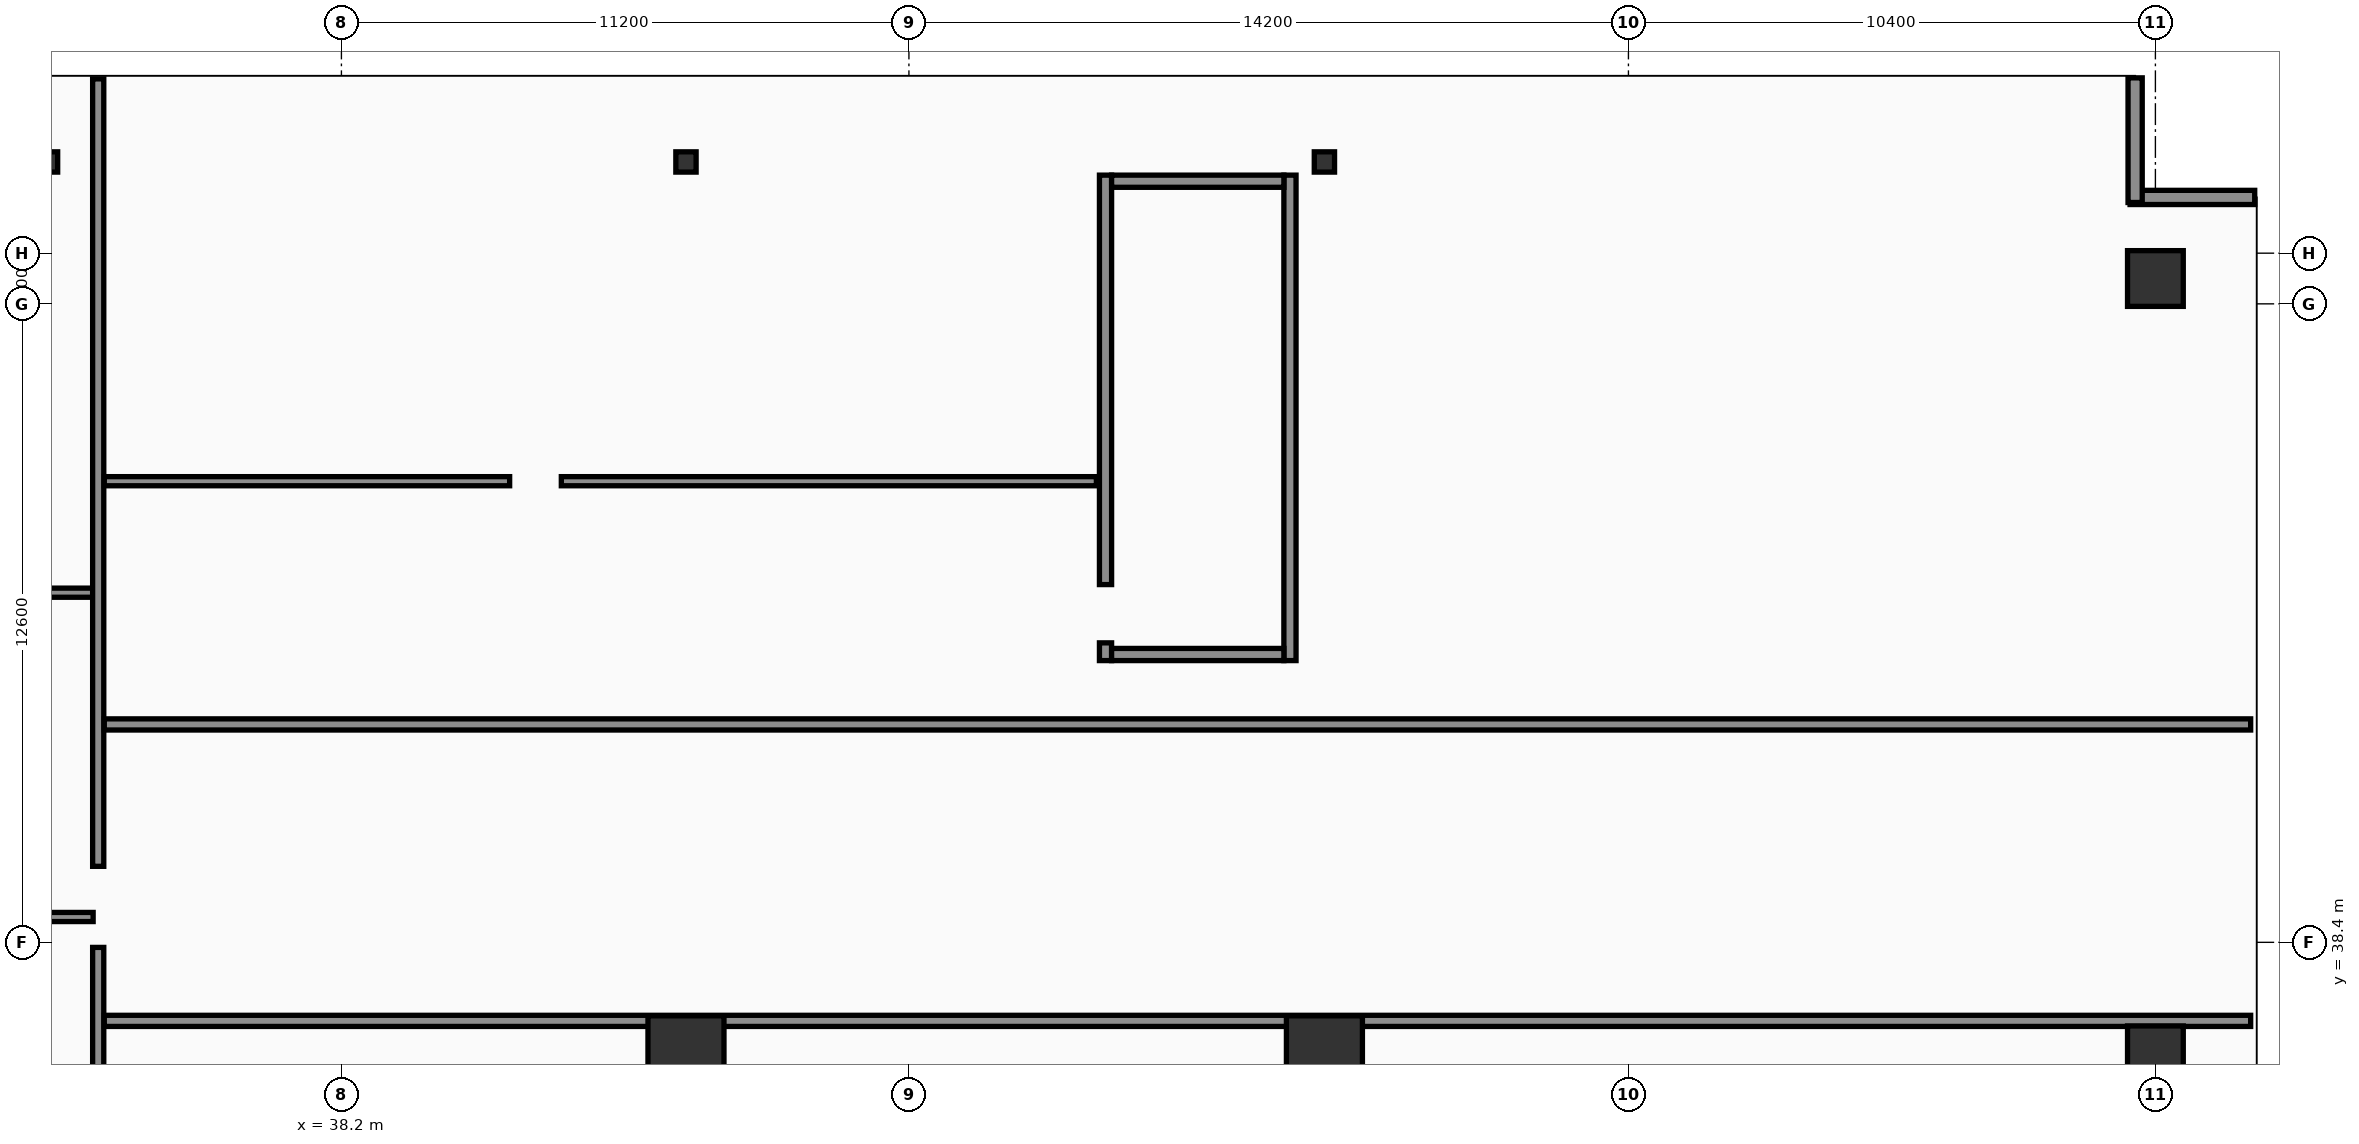
"""IFC4 building model, lengths in metres.
Left out: names, types, materials, properties, quantities, classifications, styles, units other than length and angle.
Written with IfcOpenShell. Run it as: python <this file> out.ifc"""

import sys

from ifc_helpers import new_model, si_unit, direction, frame, frame_2d, origin, origin_2d, place, context, subcontext, project, spatial, rectangle, hollow_rectangle, i_section, extrude, element, fill, save


model = new_model("IFC4")
c1 = context("Model", 3, precision=1e-05, world=origin(), true_north=direction((0.0, 1.0)))
c2 = subcontext(c1, "Body", "Model", "MODEL_VIEW")
j1 = project(units=[si_unit("LENGTHUNIT", "METRE"), si_unit("PLANEANGLEUNIT", "RADIAN")], contexts=[c1])
p1 = place(None, origin())
s1 = spatial("IfcSite", under=j1, at=p1, CompositionType="ELEMENT")
p2 = place(p1, origin())
s2 = spatial("IfcBuilding", under=s1, at=p2, CompositionType="ELEMENT")
p3 = place(p2, frame((0.0, 0.0, 22.0)))
s3 = spatial("IfcBuildingStorey", under=s2, at=p3, CompositionType="ELEMENT", Elevation=22.0)
p4 = place(p3, frame((53.28, 43.96, 0.0), z_axis=(0.0, 0.0, 1.0), x_axis=(0.0, 1.0, 0.0)))
e1 = element("IfcWall", 1, at=p4, inside=s3, PredefinedType="SOLIDWALL", context=c2, shape_type="SweptSolid", body=[
    extrude(rectangle(XDim=9.58, YDim=0.24, at=frame_2d((4.79, 0.0))), origin(), (0.0, 0.0, 1.0), 4.76),
])
p5 = place(p4, frame((0.35, 0.0, 0.0)))
e2 = element("IfcOpeningElement", 2, at=p5, cuts=e1, PredefinedType="OPENING", context=c2, shape_type="SweptSolid", body=[
    extrude(rectangle(XDim=1.15, YDim=2.2, at=frame_2d((0.575, 1.1))), frame((0.0, 0.13, 0.0), z_axis=(0.0, -1.0, 0.0), x_axis=(1.0, 0.0, 0.0)), (0.0, 0.0, 1.0), 0.26),
])
p6 = place(p3, frame((56.92, 43.96, 0.0), z_axis=(0.0, 0.0, 1.0), x_axis=(0.0, 1.0, 0.0)))
e3 = element("IfcWall", 3, at=p6, inside=s3, PredefinedType="SOLIDWALL", context=c2, shape_type="SweptSolid", body=[
    extrude(rectangle(XDim=9.58, YDim=0.24, at=frame_2d((4.79, 0.0))), origin(), (0.0, 0.0, 1.0), 4.76),
])
for number, where, z_axis, x_axis in (
    (4, (53.4, 44.08, 0.0), (0.0, 0.0, 1.0), (1.0, 0.0, 0.0)),
    (5, (53.4, 53.42, 0.0), (0.0, 0.0, 1.0), (1.0, 0.0, 0.0)),
):
    element("IfcWall", number, at=place(p3, frame(where, z_axis=z_axis, x_axis=x_axis)), inside=s3, PredefinedType="SOLIDWALL", context=c2, shape_type="SweptSolid", body=[
        extrude(rectangle(XDim=3.4, YDim=0.24, at=frame_2d((1.7, 0.0))), origin(), (0.0, 0.0, 1.0), 4.76),
    ])
for number, where, z_axis, x_axis in (
    (6, (74.0, 36.2, 0.0), (0.0, 0.0, 1.0), (1.0, 0.0, 0.0)),
    (7, (74.0, 51.5, 0.0), (0.0, 0.0, 1.0), (1.0, 0.0, 0.0)),
):
    element("IfcColumn", number, at=place(p3, frame(where, z_axis=z_axis, x_axis=x_axis)), inside=s3, PredefinedType="COLUMN", context=c2, shape_type="SweptSolid", body=[
        extrude(hollow_rectangle(XDim=1.1, YDim=1.1, WallThickness=0.045, at=origin_2d()), origin(), (0.0, 0.0, 1.0), 4.76),
    ])
for number, where, z_axis, x_axis in (
    (8, (45.0, 36.2, 0.0), (0.0, 0.0, 1.0), (1.0, 0.0, 0.0)),
    (9, (57.6, 36.2, 0.0), (0.0, 0.0, 1.0), (1.0, 0.0, 0.0)),
):
    element("IfcColumn", number, at=place(p3, frame(where, z_axis=z_axis, x_axis=x_axis)), inside=s3, PredefinedType="COLUMN", context=c2, shape_type="SweptSolid", body=[
        extrude(rectangle(XDim=1.5, YDim=1.5, at=origin_2d()), origin(), (0.0, 0.0, 1.0), 4.76),
    ])
for number, where, z_axis, x_axis in (
    (10, (32.4, 53.8, 0.0), (0.0, 0.0, 1.0), (1.0, 0.0, 0.0)),
    (11, (45.0, 53.8, 0.0), (0.0, 0.0, 1.0), (1.0, 0.0, 0.0)),
    (12, (57.6, 53.8, 0.0), (0.0, 0.0, 1.0), (1.0, 0.0, 0.0)),
):
    element("IfcColumn", number, at=place(p3, frame(where, z_axis=z_axis, x_axis=x_axis)), inside=s3, PredefinedType="PILASTER", context=c2, shape_type="SweptSolid", body=[
        extrude(i_section(OverallWidth=0.4, OverallDepth=0.4, WebThickness=0.013, FlangeThickness=0.021, FilletRadius=0.022, at=origin_2d()), origin(), (0.0, 0.0, 1.0), 4.76),
    ])
for number, where, z_axis, x_axis in (
    (13, (75.96, 53.1, 0.0), (0.0, 0.0, 1.0), (-1.0, 0.0, 0.0)),
    (14, (73.6, 53.0, 0.0), (0.0, 0.0, 1.0), (0.0, 1.0, 0.0)),
):
    element("IfcWall", number, at=place(p3, frame(where, z_axis=z_axis, x_axis=x_axis)), inside=s3, PredefinedType="SOLIDWALL", context=c2, shape_type="SweptSolid", body=[
        extrude(rectangle(XDim=2.46, YDim=0.28, at=frame_2d((1.23, 0.0))), origin(), (0.0, 0.0, 1.0), 4.76),
    ])
p7 = place(p3, frame((15.2, 38.9, 0.0), z_axis=(0.0, 0.0, 1.0), x_axis=(1.0, 0.0, 0.0)))
e15 = element("IfcWall", 15, at=p7, inside=s3, PredefinedType="PARTITIONING", context=c2, shape_type="SweptSolid", body=[
    extrude(rectangle(XDim=18.1, YDim=0.18, at=frame_2d((9.05, 0.0))), origin(), (0.0, 0.0, 1.0), 3.94),
])
p8 = place(p7, frame((2.2, 0.0, 0.0)))
e16 = element("IfcOpeningElement", 16, at=p8, cuts=e15, PredefinedType="OPENING", context=c2, shape_type="SweptSolid", body=[
    extrude(rectangle(XDim=1.02, YDim=2.2, at=frame_2d((0.51, 1.1))), frame((0.0, 0.1, 0.0), z_axis=(0.0, -1.0, 0.0), x_axis=(1.0, 0.0, 0.0)), (0.0, 0.0, 1.0), 0.2),
])
p9 = place(p7, frame((8.2, 0.0, 0.0)))
e17 = element("IfcOpeningElement", 17, at=p9, cuts=e15, PredefinedType="OPENING", context=c2, shape_type="SweptSolid", body=[
    extrude(rectangle(XDim=1.02, YDim=2.2, at=frame_2d((0.51, 1.1))), frame((0.0, 0.1, 0.0), z_axis=(0.0, -1.0, 0.0), x_axis=(1.0, 0.0, 0.0)), (0.0, 0.0, 1.0), 0.2),
])
p10 = place(p7, frame((14.2, 0.0, 0.0)))
e18 = element("IfcOpeningElement", 18, at=p10, cuts=e15, PredefinedType="OPENING", context=c2, shape_type="SweptSolid", body=[
    extrude(rectangle(XDim=1.02, YDim=2.2, at=frame_2d((0.51, 1.1))), frame((0.0, 0.1, 0.0), z_axis=(0.0, -1.0, 0.0), x_axis=(1.0, 0.0, 0.0)), (0.0, 0.0, 1.0), 0.2),
])
p11 = place(p3, frame((15.2, 45.3, 0.0), z_axis=(0.0, 0.0, 1.0), x_axis=(1.0, 0.0, 0.0)))
e19 = element("IfcWall", 19, at=p11, inside=s3, PredefinedType="PARTITIONING", context=c2, shape_type="SweptSolid", body=[
    extrude(rectangle(XDim=18.1, YDim=0.18, at=frame_2d((9.05, 0.0))), origin(), (0.0, 0.0, 1.0), 3.94),
])
p12 = place(p3, frame((33.4, 34.1, 0.0), z_axis=(0.0, 0.0, 1.0), x_axis=(0.0, 1.0, 0.0)))
e20 = element("IfcWall", 20, at=p12, inside=s3, PredefinedType="SOLIDWALL", context=c2, shape_type="SweptSolid", body=[
    extrude(rectangle(XDim=21.34, YDim=0.22, at=frame_2d((10.67, 0.0))), origin(), (0.0, 0.0, 1.0), 3.94),
])
p13 = place(p12, frame((4.2, 0.0, 0.0)))
e21 = element("IfcOpeningElement", 21, at=p13, cuts=e20, PredefinedType="OPENING", context=c2, shape_type="SweptSolid", body=[
    extrude(rectangle(XDim=1.6, YDim=2.35, at=frame_2d((0.8, 1.175))), frame((0.0, 0.12, 0.0), z_axis=(0.0, -1.0, 0.0), x_axis=(1.0, 0.0, 0.0)), (0.0, 0.0, 1.0), 0.24),
])
for number, where, z_axis, x_axis in (
    (22, (33.52, 36.85, 0.0), (0.0, 0.0, 1.0), (1.0, 0.0, 0.0)),
    (23, (33.52, 42.7, 0.0), (0.0, 0.0, 1.0), (1.0, 0.0, 0.0)),
):
    element("IfcWall", number, at=place(p3, frame(where, z_axis=z_axis, x_axis=x_axis)), inside=s3, PredefinedType="SOLIDWALL", context=c2, shape_type="SweptSolid", body=[
        extrude(rectangle(XDim=42.36, YDim=0.22, at=frame_2d((21.18, 0.0))), origin(), (0.0, 0.0, 1.0), 3.94),
    ])
p14 = place(p3, frame((33.52, 47.5, 0.0), z_axis=(0.0, 0.0, 1.0), x_axis=(1.0, 0.0, 0.0)))
e24 = element("IfcWall", 24, at=p14, inside=s3, PredefinedType="PARTITIONING", context=c2, shape_type="SweptSolid", body=[
    extrude(rectangle(XDim=19.58, YDim=0.18, at=frame_2d((9.79, 0.0))), origin(), (0.0, 0.0, 1.0), 3.94),
])
p15 = place(p14, frame((8.0, 0.0, 0.0)))
e25 = element("IfcOpeningElement", 25, at=p15, cuts=e24, PredefinedType="OPENING", context=c2, shape_type="SweptSolid", body=[
    extrude(rectangle(XDim=1.02, YDim=2.2, at=frame_2d((0.51, 1.1))), frame((0.0, 0.1, 0.0), z_axis=(0.0, -1.0, 0.0), x_axis=(1.0, 0.0, 0.0)), (0.0, 0.0, 1.0), 0.2),
])
p16 = place(p13, origin())
e26 = element("IfcDoor", 26, at=p16, inside=s3, OperationType="SINGLE_SWING_LEFT", PredefinedType="DOOR", context=c2, shape_type="SweptSolid", body=[
    extrude(rectangle(XDim=1.6, YDim=2.35, at=frame_2d((0.8, 1.175))), frame((0.0, 0.025, 0.0), z_axis=(0.0, -1.0, 0.0), x_axis=(1.0, 0.0, 0.0)), (0.0, 0.0, 1.0), 0.05),
])
fill(e21, e26)
p17 = place(p15, origin())
e27 = element("IfcDoor", 27, at=p17, inside=s3, OperationType="SINGLE_SWING_LEFT", PredefinedType="DOOR", context=c2, shape_type="SweptSolid", body=[
    extrude(rectangle(XDim=1.02, YDim=2.2, at=frame_2d((0.51, 1.1))), frame((0.0, 0.025, 0.0), z_axis=(0.0, -1.0, 0.0), x_axis=(1.0, 0.0, 0.0)), (0.0, 0.0, 1.0), 0.05),
])
fill(e25, e27)
p18 = place(p5, origin())
e28 = element("IfcDoor", 28, at=p18, inside=s3, OperationType="SINGLE_SWING_LEFT", PredefinedType="DOOR", context=c2, shape_type="SweptSolid", body=[
    extrude(rectangle(XDim=1.15, YDim=2.2, at=frame_2d((0.575, 1.1))), frame((0.0, 0.025, 0.0), z_axis=(0.0, -1.0, 0.0), x_axis=(1.0, 0.0, 0.0)), (0.0, 0.0, 1.0), 0.05),
])
fill(e2, e28)
save(model, sys.argv[1])
